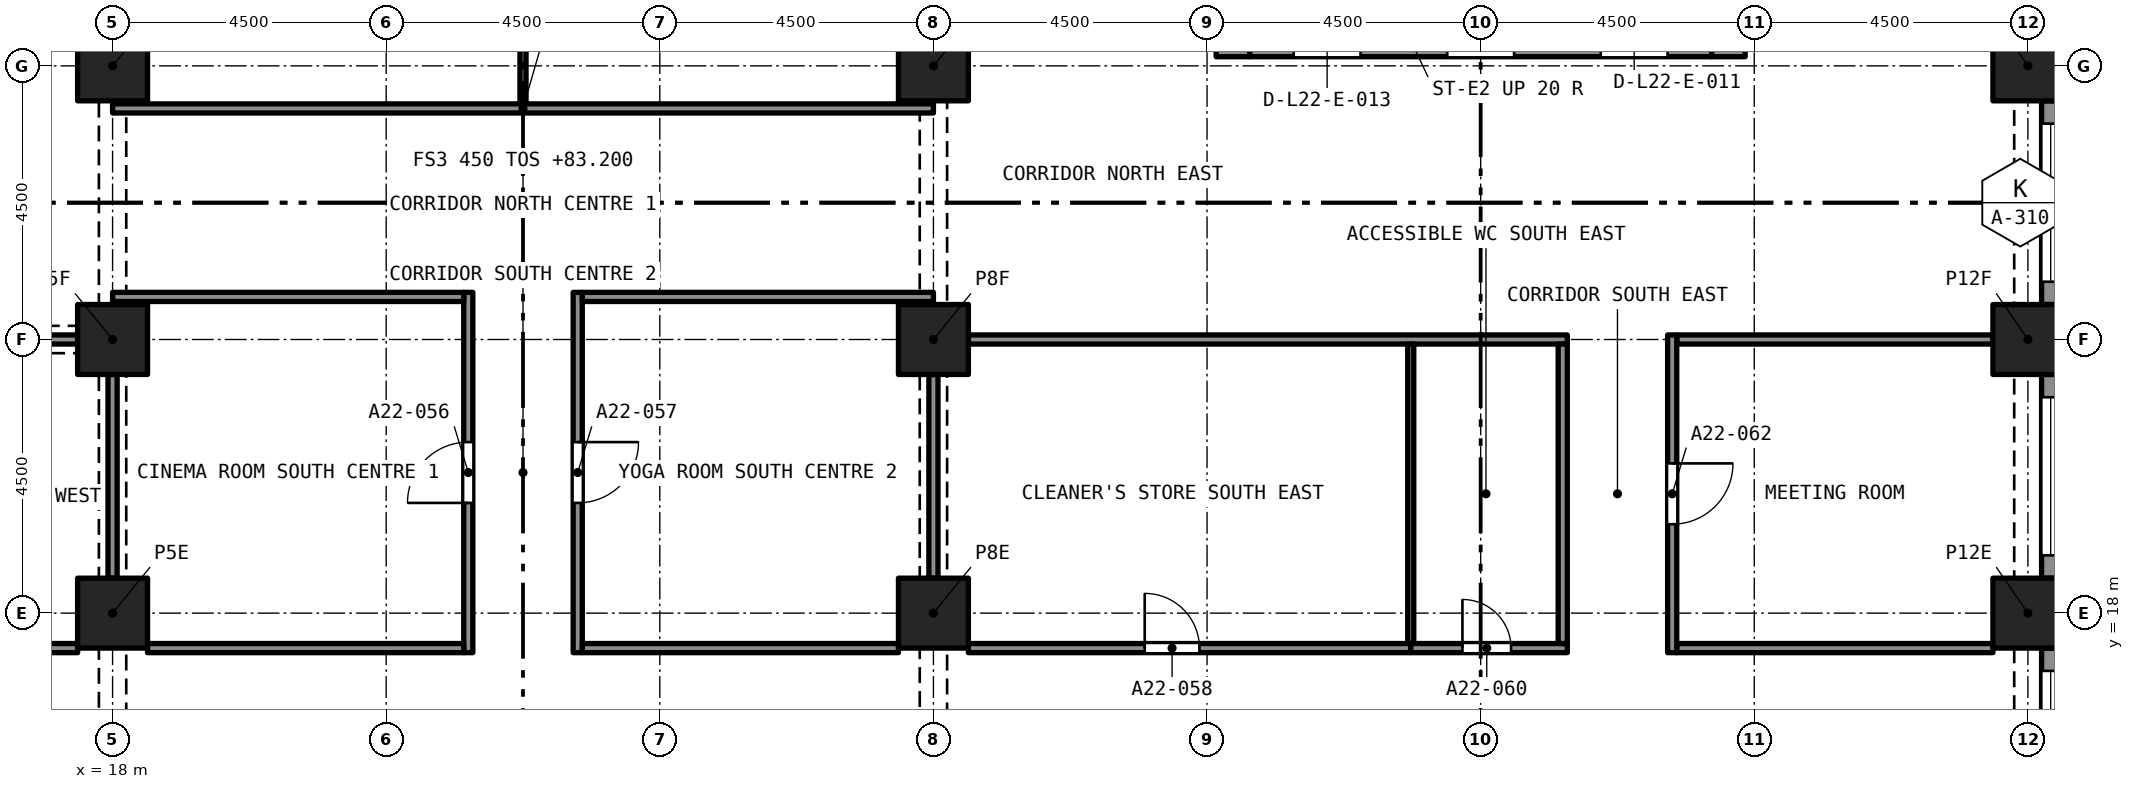
"""IFC4 building model, lengths in metres.
Left out: names, types, materials, properties, quantities, classifications, styles, units other than length and angle.
Written with IfcOpenShell. Run it as: python <this file> out.ifc"""

import sys

from ifc_helpers import new_model, si_unit, direction, frame, frame_2d, origin, origin_2d, place, context, subcontext, project, spatial, rectangle, extrude, element, fill, save


model = new_model("IFC4")
c1 = context("Model", 3, precision=1e-05, world=origin(), true_north=direction((0.0, 1.0)))
c2 = subcontext(c1, "Body", "Model", "MODEL_VIEW")
j1 = project(units=[si_unit("LENGTHUNIT", "METRE"), si_unit("PLANEANGLEUNIT", "RADIAN")], contexts=[c1])
p1 = place(None, origin())
s1 = spatial("IfcSite", under=j1, at=p1, CompositionType="ELEMENT")
p2 = place(p1, origin())
s2 = spatial("IfcBuilding", under=s1, at=p2, CompositionType="ELEMENT")
p3 = place(p2, frame((0.0, 0.0, 83.2)))
s3 = spatial("IfcBuildingStorey", under=s2, at=p3, CompositionType="ELEMENT", Elevation=83.2)
for number, where, z_axis, x_axis in (
    (1, (18.0, 18.0, 0.0), (0.0, 0.0, 1.0), (1.0, 0.0, 0.0)),
    (2, (31.5, 18.0, 0.0), (0.0, 0.0, 1.0), (1.0, 0.0, 0.0)),
    (3, (49.5, 18.0, 0.0), (0.0, 0.0, 1.0), (1.0, 0.0, 0.0)),
    (4, (18.0, 22.5, 0.0), (0.0, 0.0, 1.0), (1.0, 0.0, 0.0)),
    (5, (31.5, 22.5, 0.0), (0.0, 0.0, 1.0), (1.0, 0.0, 0.0)),
    (6, (49.5, 22.5, 0.0), (0.0, 0.0, 1.0), (1.0, 0.0, 0.0)),
    (7, (18.0, 27.0, 0.0), (0.0, 0.0, 1.0), (1.0, 0.0, 0.0)),
    (8, (31.5, 27.0, 0.0), (0.0, 0.0, 1.0), (1.0, 0.0, 0.0)),
    (9, (49.5, 27.0, 0.0), (0.0, 0.0, 1.0), (1.0, 0.0, 0.0)),
):
    element("IfcColumn", number, at=place(p3, frame(where, z_axis=z_axis, x_axis=x_axis)), inside=s3, PredefinedType="COLUMN", context=c2, shape_type="SweptSolid", body=[
        extrude(rectangle(XDim=1.15, YDim=1.15, at=origin_2d()), origin(), (0.0, 0.0, 1.0), 3.2),
    ])
p4 = place(p3, frame((36.7, 27.425, 0.0), z_axis=(0.0, 0.0, 1.0), x_axis=(1.0, 0.0, 0.0)))
e10 = element("IfcWall", 10, at=p4, inside=s3, PredefinedType="SOLIDWALL", context=c2, shape_type="SweptSolid", body=[
    extrude(rectangle(XDim=7.6, YDim=0.55, at=frame_2d((3.8, 0.0))), origin(), (0.0, 0.0, 1.0), 3.2),
])
p5 = place(p4, frame((5.775, 0.0, 0.0)))
e11 = element("IfcOpeningElement", 11, at=p5, cuts=e10, PredefinedType="OPENING", context=c2, shape_type="SweptSolid", body=[
    extrude(rectangle(XDim=1.1, YDim=2.1, at=frame_2d((0.55, 1.05))), frame((0.0, 0.285, 0.0), z_axis=(0.0, -1.0, 0.0), x_axis=(1.0, 0.0, 0.0)), (0.0, 0.0, 1.0), 0.57),
])
p6 = place(p4, frame((3.25, 0.0, 0.0)))
e12 = element("IfcOpeningElement", 12, at=p6, cuts=e10, PredefinedType="OPENING", context=c2, shape_type="SweptSolid", body=[
    extrude(rectangle(XDim=1.1, YDim=2.1, at=frame_2d((0.55, 1.05))), frame((0.0, 0.285, 0.0), z_axis=(0.0, -1.0, 0.0), x_axis=(1.0, 0.0, 0.0)), (0.0, 0.0, 1.0), 0.57),
])
p7 = place(p4, frame((0.725, 0.0, 0.0)))
e13 = element("IfcOpeningElement", 13, at=p7, cuts=e10, PredefinedType="OPENING", context=c2, shape_type="SweptSolid", body=[
    extrude(rectangle(XDim=1.1, YDim=2.1, at=frame_2d((0.55, 1.05))), frame((0.0, 0.285, 0.0), z_axis=(0.0, -1.0, 0.0), x_axis=(1.0, 0.0, 0.0)), (0.0, 0.0, 1.0), 0.57),
])
p8 = place(p3, frame((36.425, 27.15, 0.0), z_axis=(0.0, 0.0, 1.0), x_axis=(0.0, 1.0, 0.0)))
e14 = element("IfcWall", 14, at=p8, inside=s3, PredefinedType="SOLIDWALL", context=c2, shape_type="SweptSolid", body=[
    extrude(rectangle(XDim=13.2, YDim=0.55, at=frame_2d((6.6, 0.0))), origin(), (0.0, 0.0, 1.0), 3.2),
])
p9 = place(p8, frame((8.8, 0.0, 0.0)))
e15 = element("IfcOpeningElement", 15, at=p9, cuts=e14, PredefinedType="OPENING", context=c2, shape_type="SweptSolid", body=[
    extrude(rectangle(XDim=1.2, YDim=2.1, at=frame_2d((0.6, 1.05))), frame((0.0, 0.285, 0.0), z_axis=(0.0, -1.0, 0.0), x_axis=(1.0, 0.0, 0.0)), (0.0, 0.0, 1.0), 0.57),
])
p10 = place(p3, frame((44.575, 27.15, 0.0), z_axis=(0.0, 0.0, 1.0), x_axis=(0.0, 1.0, 0.0)))
e16 = element("IfcWall", 16, at=p10, inside=s3, PredefinedType="SOLIDWALL", context=c2, shape_type="SweptSolid", body=[
    extrude(rectangle(XDim=13.2, YDim=0.55, at=frame_2d((6.6, 0.0))), origin(), (0.0, 0.0, 1.0), 3.2),
])
p11 = place(p10, frame((8.8, 0.0, 0.0)))
e17 = element("IfcOpeningElement", 17, at=p11, cuts=e16, PredefinedType="OPENING", context=c2, shape_type="SweptSolid", body=[
    extrude(rectangle(XDim=1.2, YDim=2.1, at=frame_2d((0.6, 1.05))), frame((0.0, 0.285, 0.0), z_axis=(0.0, -1.0, 0.0), x_axis=(1.0, 0.0, 0.0)), (0.0, 0.0, 1.0), 0.57),
])
p12 = place(p3, frame((49.875, 17.425, 0.0), z_axis=(0.0, 0.0, 1.0), x_axis=(0.0, -1.0, 0.0)))
e18 = element("IfcWall", 18, at=p12, inside=s3, PredefinedType="SOLIDWALL", context=c2, shape_type="SweptSolid", body=[
    extrude(rectangle(XDim=3.35, YDim=0.3, at=frame_2d((1.675, 0.0))), origin(), (0.0, 0.0, 1.0), 3.2),
])
p13 = place(p12, frame((0.375, 0.0, 0.45)))
e19 = element("IfcOpeningElement", 19, at=p13, cuts=e18, PredefinedType="OPENING", context=c2, shape_type="SweptSolid", body=[
    extrude(rectangle(XDim=2.6, YDim=1.95, at=frame_2d((1.3, 0.975))), frame((0.0, 0.16, 0.0), z_axis=(0.0, -1.0, 0.0), x_axis=(1.0, 0.0, 0.0)), (0.0, 0.0, 1.0), 0.32),
])
p14 = place(p3, frame((49.875, 21.925, 0.0), z_axis=(0.0, 0.0, 1.0), x_axis=(0.0, -1.0, 0.0)))
e20 = element("IfcWall", 20, at=p14, inside=s3, PredefinedType="SOLIDWALL", context=c2, shape_type="SweptSolid", body=[
    extrude(rectangle(XDim=3.35, YDim=0.3, at=frame_2d((1.675, 0.0))), origin(), (0.0, 0.0, 1.0), 3.2),
])
p15 = place(p14, frame((0.375, 0.0, 0.45)))
e21 = element("IfcOpeningElement", 21, at=p15, cuts=e20, PredefinedType="OPENING", context=c2, shape_type="SweptSolid", body=[
    extrude(rectangle(XDim=2.6, YDim=1.95, at=frame_2d((1.3, 0.975))), frame((0.0, 0.16, 0.0), z_axis=(0.0, -1.0, 0.0), x_axis=(1.0, 0.0, 0.0)), (0.0, 0.0, 1.0), 0.32),
])
p16 = place(p3, frame((49.875, 26.425, 0.0), z_axis=(0.0, 0.0, 1.0), x_axis=(0.0, -1.0, 0.0)))
e22 = element("IfcWall", 22, at=p16, inside=s3, PredefinedType="SOLIDWALL", context=c2, shape_type="SweptSolid", body=[
    extrude(rectangle(XDim=3.35, YDim=0.3, at=frame_2d((1.675, 0.0))), origin(), (0.0, 0.0, 1.0), 3.2),
])
p17 = place(p16, frame((0.375, 0.0, 0.45)))
e23 = element("IfcOpeningElement", 23, at=p17, cuts=e22, PredefinedType="OPENING", context=c2, shape_type="SweptSolid", body=[
    extrude(rectangle(XDim=2.6, YDim=1.95, at=frame_2d((1.3, 0.975))), frame((0.0, 0.16, 0.0), z_axis=(0.0, -1.0, 0.0), x_axis=(1.0, 0.0, 0.0)), (0.0, 0.0, 1.0), 0.32),
])
p18 = place(p3, frame((23.85, 17.35, 0.0), z_axis=(0.0, 0.0, 1.0), x_axis=(0.0, 1.0, 0.0)))
e24 = element("IfcWall", 24, at=p18, inside=s3, PredefinedType="PARTITIONING", context=c2, shape_type="SweptSolid", body=[
    extrude(rectangle(XDim=5.925, YDim=0.15, at=frame_2d((2.962, 0.0))), origin(), (0.0, 0.0, 1.0), 2.75),
])
p19 = place(p18, frame((2.462, 0.0, 0.0)))
e25 = element("IfcOpeningElement", 25, at=p19, cuts=e24, PredefinedType="OPENING", context=c2, shape_type="SweptSolid", body=[
    extrude(rectangle(XDim=1.0, YDim=2.1, at=frame_2d((0.5, 1.05))), frame((0.0, 0.085, 0.0), z_axis=(0.0, -1.0, 0.0), x_axis=(1.0, 0.0, 0.0)), (0.0, 0.0, 1.0), 0.17),
])
p20 = place(p3, frame((25.65, 23.275, 0.0), z_axis=(0.0, 0.0, 1.0), x_axis=(0.0, -1.0, 0.0)))
e26 = element("IfcWall", 26, at=p20, inside=s3, PredefinedType="PARTITIONING", context=c2, shape_type="SweptSolid", body=[
    extrude(rectangle(XDim=5.925, YDim=0.15, at=frame_2d((2.962, 0.0))), origin(), (0.0, 0.0, 1.0), 2.75),
])
p21 = place(p20, frame((2.462, 0.0, 0.0)))
e27 = element("IfcOpeningElement", 27, at=p21, cuts=e26, PredefinedType="OPENING", context=c2, shape_type="SweptSolid", body=[
    extrude(rectangle(XDim=1.0, YDim=2.1, at=frame_2d((0.5, 1.05))), frame((0.0, 0.085, 0.0), z_axis=(0.0, -1.0, 0.0), x_axis=(1.0, 0.0, 0.0)), (0.0, 0.0, 1.0), 0.17),
])
for number, where, z_axis, x_axis in (
    (28, (18.575, 17.425, 0.0), (0.0, 0.0, 1.0), (1.0, 0.0, 0.0)),
    (29, (25.725, 17.425, 0.0), (0.0, 0.0, 1.0), (1.0, 0.0, 0.0)),
):
    element("IfcWall", number, at=place(p3, frame(where, z_axis=z_axis, x_axis=x_axis)), inside=s3, PredefinedType="PARTITIONING", context=c2, shape_type="SweptSolid", body=[
        extrude(rectangle(XDim=5.2, YDim=0.15, at=frame_2d((2.6, 0.0))), origin(), (0.0, 0.0, 1.0), 2.75),
    ])
p22 = place(p3, frame((32.075, 17.425, 0.0), z_axis=(0.0, 0.0, 1.0), x_axis=(1.0, 0.0, 0.0)))
e30 = element("IfcWall", 30, at=p22, inside=s3, PredefinedType="PARTITIONING", context=c2, shape_type="SweptSolid", body=[
    extrude(rectangle(XDim=7.275, YDim=0.15, at=frame_2d((3.638, 0.0))), origin(), (0.0, 0.0, 1.0), 2.9),
])
p23 = place(p22, frame((2.9, 0.0, 0.0)))
e31 = element("IfcOpeningElement", 31, at=p23, cuts=e30, PredefinedType="OPENING", context=c2, shape_type="SweptSolid", body=[
    extrude(rectangle(XDim=0.9, YDim=2.1, at=frame_2d((0.45, 1.05))), frame((0.0, 0.085, 0.0), z_axis=(0.0, -1.0, 0.0), x_axis=(1.0, 0.0, 0.0)), (0.0, 0.0, 1.0), 0.17),
])
p24 = place(p3, frame((10.15, 17.425, 0.0), z_axis=(0.0, 0.0, 1.0), x_axis=(1.0, 0.0, 0.0)))
e32 = element("IfcWall", 32, at=p24, inside=s3, PredefinedType="PARTITIONING", context=c2, shape_type="SweptSolid", body=[
    extrude(rectangle(XDim=7.275, YDim=0.15, at=frame_2d((3.638, 0.0))), origin(), (0.0, 0.0, 1.0), 2.9),
])
p25 = place(p24, frame((3.475, 0.0, 0.0)))
e33 = element("IfcOpeningElement", 33, at=p25, cuts=e32, PredefinedType="OPENING", context=c2, shape_type="SweptSolid", body=[
    extrude(rectangle(XDim=0.9, YDim=2.1, at=frame_2d((0.45, 1.05))), frame((0.0, 0.085, 0.0), z_axis=(0.0, -1.0, 0.0), x_axis=(1.0, 0.0, 0.0)), (0.0, 0.0, 1.0), 0.17),
])
p26 = place(p3, frame((39.35, 17.425, 0.0), z_axis=(0.0, 0.0, 1.0), x_axis=(1.0, 0.0, 0.0)))
e34 = element("IfcWall", 34, at=p26, inside=s3, PredefinedType="PARTITIONING", context=c2, shape_type="SweptSolid", body=[
    extrude(rectangle(XDim=2.575, YDim=0.15, at=frame_2d((1.288, 0.0))), origin(), (0.0, 0.0, 1.0), 2.9),
])
p27 = place(p26, frame((0.85, 0.0, 0.0)))
e35 = element("IfcOpeningElement", 35, at=p27, cuts=e34, PredefinedType="OPENING", context=c2, shape_type="SweptSolid", body=[
    extrude(rectangle(XDim=0.8, YDim=2.1, at=frame_2d((0.4, 1.05))), frame((0.0, 0.085, 0.0), z_axis=(0.0, -1.0, 0.0), x_axis=(1.0, 0.0, 0.0)), (0.0, 0.0, 1.0), 0.17),
])
p28 = place(p3, frame((43.725, 17.425, 0.0), z_axis=(0.0, 0.0, 1.0), x_axis=(1.0, 0.0, 0.0)))
e36 = element("IfcWall", 36, at=p28, inside=s3, PredefinedType="PARTITIONING", context=c2, shape_type="SweptSolid", body=[
    extrude(rectangle(XDim=5.2, YDim=0.15, at=frame_2d((2.6, 0.0))), origin(), (0.0, 0.0, 1.0), 2.9),
])
p29 = place(p3, frame((24.75, 26.375, 0.0), z_axis=(0.0, 0.0, 1.0), x_axis=(0.0, 1.0, 0.0)))
e37 = element("IfcWall", 37, at=p29, inside=s3, PredefinedType="PARTITIONING", context=c2, shape_type="SweptSolid", body=[
    extrude(rectangle(XDim=10.125, YDim=0.1, at=frame_2d((5.062, 0.0))), origin(), (0.0, 0.0, 1.0), 2.75),
])
p30 = place(p3, frame((18.0, 26.3, 0.0), z_axis=(0.0, 0.0, 1.0), x_axis=(1.0, 0.0, 0.0)))
e38 = element("IfcWall", 38, at=p30, inside=s3, PredefinedType="PARTITIONING", context=c2, shape_type="SweptSolid", body=[
    extrude(rectangle(XDim=13.5, YDim=0.15, at=frame_2d((6.75, 0.0))), origin(), (0.0, 0.0, 1.0), 2.38),
])
p31 = place(p3, frame((18.0, 23.2, 0.0), z_axis=(0.0, 0.0, 1.0), x_axis=(1.0, 0.0, 0.0)))
e39 = element("IfcWall", 39, at=p31, inside=s3, PredefinedType="PARTITIONING", context=c2, shape_type="SweptSolid", body=[
    extrude(rectangle(XDim=5.775, YDim=0.15, at=frame_2d((2.887, 0.0))), origin(), (0.0, 0.0, 1.0), 2.75),
])
p32 = place(p3, frame((18.0, 18.575, 0.0), z_axis=(0.0, 0.0, 1.0), x_axis=(0.0, 1.0, 0.0)))
e40 = element("IfcWall", 40, at=p32, inside=s3, PredefinedType="PARTITIONING", context=c2, shape_type="SweptSolid", body=[
    extrude(rectangle(XDim=3.35, YDim=0.15, at=frame_2d((1.675, 0.0))), origin(), (0.0, 0.0, 1.0), 2.38),
])
p33 = place(p3, frame((25.725, 23.2, 0.0), z_axis=(0.0, 0.0, 1.0), x_axis=(1.0, 0.0, 0.0)))
e41 = element("IfcWall", 41, at=p33, inside=s3, PredefinedType="PARTITIONING", context=c2, shape_type="SweptSolid", body=[
    extrude(rectangle(XDim=5.775, YDim=0.15, at=frame_2d((2.887, 0.0))), origin(), (0.0, 0.0, 1.0), 2.75),
])
p34 = place(p3, frame((31.5, 18.575, 0.0), z_axis=(0.0, 0.0, 1.0), x_axis=(0.0, 1.0, 0.0)))
e42 = element("IfcWall", 42, at=p34, inside=s3, PredefinedType="PARTITIONING", context=c2, shape_type="SweptSolid", body=[
    extrude(rectangle(XDim=3.35, YDim=0.15, at=frame_2d((1.675, 0.0))), origin(), (0.0, 0.0, 1.0), 2.38),
])
p35 = place(p3, frame((32.075, 22.5, 0.0), z_axis=(0.0, 0.0, 1.0), x_axis=(1.0, 0.0, 0.0)))
e43 = element("IfcWall", 43, at=p35, inside=s3, PredefinedType="PARTITIONING", context=c2, shape_type="SweptSolid", body=[
    extrude(rectangle(XDim=9.85, YDim=0.15, at=frame_2d((4.925, 0.0))), origin(), (0.0, 0.0, 1.0), 2.9),
])
p36 = place(p3, frame((43.725, 22.5, 0.0), z_axis=(0.0, 0.0, 1.0), x_axis=(1.0, 0.0, 0.0)))
e44 = element("IfcWall", 44, at=p36, inside=s3, PredefinedType="PARTITIONING", context=c2, shape_type="SweptSolid", body=[
    extrude(rectangle(XDim=5.2, YDim=0.15, at=frame_2d((2.6, 0.0))), origin(), (0.0, 0.0, 1.0), 2.9),
])
p37 = place(p3, frame((14.075, 22.5, 0.0), z_axis=(0.0, 0.0, 1.0), x_axis=(1.0, 0.0, 0.0)))
e45 = element("IfcWall", 45, at=p37, inside=s3, PredefinedType="PARTITIONING", context=c2, shape_type="SweptSolid", body=[
    extrude(rectangle(XDim=3.35, YDim=0.15, at=frame_2d((1.675, 0.0))), origin(), (0.0, 0.0, 1.0), 2.38),
])
p38 = place(p3, frame((41.85, 17.5, 0.0), z_axis=(0.0, 0.0, 1.0), x_axis=(0.0, 1.0, 0.0)))
e46 = element("IfcWall", 46, at=p38, inside=s3, PredefinedType="PARTITIONING", context=c2, shape_type="SweptSolid", body=[
    extrude(rectangle(XDim=4.925, YDim=0.15, at=frame_2d((2.462, 0.0))), origin(), (0.0, 0.0, 1.0), 2.9),
])
p39 = place(p3, frame((43.65, 22.575, 0.0), z_axis=(0.0, 0.0, 1.0), x_axis=(0.0, -1.0, 0.0)))
e47 = element("IfcWall", 47, at=p39, inside=s3, PredefinedType="PARTITIONING", context=c2, shape_type="SweptSolid", body=[
    extrude(rectangle(XDim=5.225, YDim=0.15, at=frame_2d((2.612, 0.0))), origin(), (0.0, 0.0, 1.0), 2.9),
])
p40 = place(p39, frame((2.113, 0.0, 0.0)))
e48 = element("IfcOpeningElement", 48, at=p40, cuts=e47, PredefinedType="OPENING", context=c2, shape_type="SweptSolid", body=[
    extrude(rectangle(XDim=1.0, YDim=2.1, at=frame_2d((0.5, 1.05))), frame((0.0, 0.085, 0.0), z_axis=(0.0, -1.0, 0.0), x_axis=(1.0, 0.0, 0.0)), (0.0, 0.0, 1.0), 0.17),
])
p41 = place(p3, frame((39.35, 17.5, 0.0), z_axis=(0.0, 0.0, 1.0), x_axis=(0.0, 1.0, 0.0)))
e49 = element("IfcWall", 49, at=p41, inside=s3, PredefinedType="PARTITIONING", context=c2, shape_type="SweptSolid", body=[
    extrude(rectangle(XDim=4.925, YDim=0.1, at=frame_2d((2.462, 0.0))), origin(), (0.0, 0.0, 1.0), 2.9),
])
p42 = place(p13, origin())
e50 = element("IfcWindow", 50, at=p42, inside=s3, PartitioningType="SINGLE_PANEL", PredefinedType="WINDOW", context=c2, shape_type="SweptSolid", body=[
    extrude(rectangle(XDim=2.6, YDim=1.95, at=frame_2d((1.3, 0.975))), frame((0.0, 0.03, 0.0), z_axis=(0.0, -1.0, 0.0), x_axis=(1.0, 0.0, 0.0)), (0.0, 0.0, 1.0), 0.06),
])
fill(e19, e50)
p43 = place(p15, origin())
e51 = element("IfcWindow", 51, at=p43, inside=s3, PartitioningType="SINGLE_PANEL", PredefinedType="WINDOW", context=c2, shape_type="SweptSolid", body=[
    extrude(rectangle(XDim=2.6, YDim=1.95, at=frame_2d((1.3, 0.975))), frame((0.0, 0.03, 0.0), z_axis=(0.0, -1.0, 0.0), x_axis=(1.0, 0.0, 0.0)), (0.0, 0.0, 1.0), 0.06),
])
fill(e21, e51)
p44 = place(p17, origin())
e52 = element("IfcWindow", 52, at=p44, inside=s3, PartitioningType="SINGLE_PANEL", PredefinedType="WINDOW", context=c2, shape_type="SweptSolid", body=[
    extrude(rectangle(XDim=2.6, YDim=1.95, at=frame_2d((1.3, 0.975))), frame((0.0, 0.03, 0.0), z_axis=(0.0, -1.0, 0.0), x_axis=(1.0, 0.0, 0.0)), (0.0, 0.0, 1.0), 0.06),
])
fill(e23, e52)
p45 = place(p19, origin())
e53 = element("IfcDoor", 53, at=p45, inside=s3, OperationType="SINGLE_SWING_RIGHT", PredefinedType="DOOR", context=c2, shape_type="SweptSolid", body=[
    extrude(rectangle(XDim=1.0, YDim=2.1, at=frame_2d((0.5, 1.05))), frame((0.0, 0.025, 0.0), z_axis=(0.0, -1.0, 0.0), x_axis=(1.0, 0.0, 0.0)), (0.0, 0.0, 1.0), 0.05),
])
fill(e25, e53)
p46 = place(p21, origin())
e54 = element("IfcDoor", 54, at=p46, inside=s3, OperationType="SINGLE_SWING_RIGHT", PredefinedType="DOOR", context=c2, shape_type="SweptSolid", body=[
    extrude(rectangle(XDim=1.0, YDim=2.1, at=frame_2d((0.5, 1.05))), frame((0.0, 0.025, 0.0), z_axis=(0.0, -1.0, 0.0), x_axis=(1.0, 0.0, 0.0)), (0.0, 0.0, 1.0), 0.05),
])
fill(e27, e54)
p47 = place(p23, origin())
e55 = element("IfcDoor", 55, at=p47, inside=s3, OperationType="SINGLE_SWING_LEFT", PredefinedType="DOOR", context=c2, shape_type="SweptSolid", body=[
    extrude(rectangle(XDim=0.9, YDim=2.1, at=frame_2d((0.45, 1.05))), frame((0.0, 0.025, 0.0), z_axis=(0.0, -1.0, 0.0), x_axis=(1.0, 0.0, 0.0)), (0.0, 0.0, 1.0), 0.05),
])
fill(e31, e55)
p48 = place(p27, origin())
e56 = element("IfcDoor", 56, at=p48, inside=s3, OperationType="SINGLE_SWING_LEFT", PredefinedType="DOOR", context=c2, shape_type="SweptSolid", body=[
    extrude(rectangle(XDim=0.8, YDim=2.1, at=frame_2d((0.4, 1.05))), frame((0.0, 0.025, 0.0), z_axis=(0.0, -1.0, 0.0), x_axis=(1.0, 0.0, 0.0)), (0.0, 0.0, 1.0), 0.05),
])
fill(e35, e56)
p49 = place(p40, origin())
e57 = element("IfcDoor", 57, at=p49, inside=s3, OperationType="SINGLE_SWING_RIGHT", PredefinedType="DOOR", context=c2, shape_type="SweptSolid", body=[
    extrude(rectangle(XDim=1.0, YDim=2.1, at=frame_2d((0.5, 1.05))), frame((0.0, 0.025, 0.0), z_axis=(0.0, -1.0, 0.0), x_axis=(1.0, 0.0, 0.0)), (0.0, 0.0, 1.0), 0.05),
])
fill(e48, e57)
save(model, sys.argv[1])
